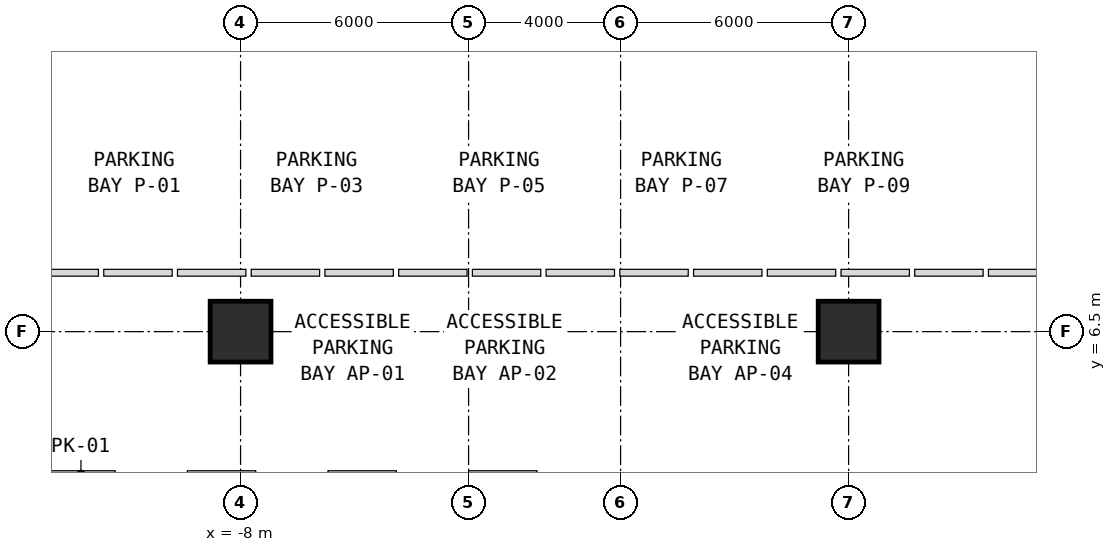
"""IFC4 building model, lengths in metres.
Left out: names, types, materials, properties, quantities, classifications, styles, units other than length and angle.
Written with IfcOpenShell. Run it as: python <this file> out.ifc"""

import sys

from ifc_helpers import new_model, si_unit, direction, frame, origin, origin_2d, place, context, subcontext, project, spatial, rectangle, extrude, element, save


model = new_model("IFC4")
c1 = context("Model", 3, precision=1e-05, world=origin(), true_north=direction((0.0, 1.0)))
c2 = subcontext(c1, "Body", "Model", "MODEL_VIEW")
j1 = project(units=[si_unit("LENGTHUNIT", "METRE"), si_unit("PLANEANGLEUNIT", "RADIAN")], contexts=[c1])
p1 = place(None, origin())
s1 = spatial("IfcSite", under=j1, at=p1, CompositionType="ELEMENT")
p2 = place(p1, origin())
s2 = spatial("IfcBuilding", under=s1, at=p2, CompositionType="ELEMENT")
p3 = place(p2, frame((0.0, 0.0, -10.0)))
s3 = spatial("IfcBuildingStorey", under=s2, at=p3, CompositionType="ELEMENT", Elevation=-10.0)
for number, where, z_axis, x_axis in (
    (1, (-8.0, 6.5, 0.0), (0.0, 0.0, 1.0), (1.0, 0.0, 0.0)),
    (2, (8.0, 6.5, 0.0), (0.0, 0.0, 1.0), (1.0, 0.0, 0.0)),
):
    element("IfcColumn", number, at=place(p3, frame(where, z_axis=z_axis, x_axis=x_axis)), inside=s3, PredefinedType="COLUMN", context=c2, shape_type="SweptSolid", body=[
        extrude(rectangle(XDim=1.6, YDim=1.6, at=origin_2d()), origin(), (0.0, 0.0, 1.0), 4.8),
    ])
save(model, sys.argv[1])
